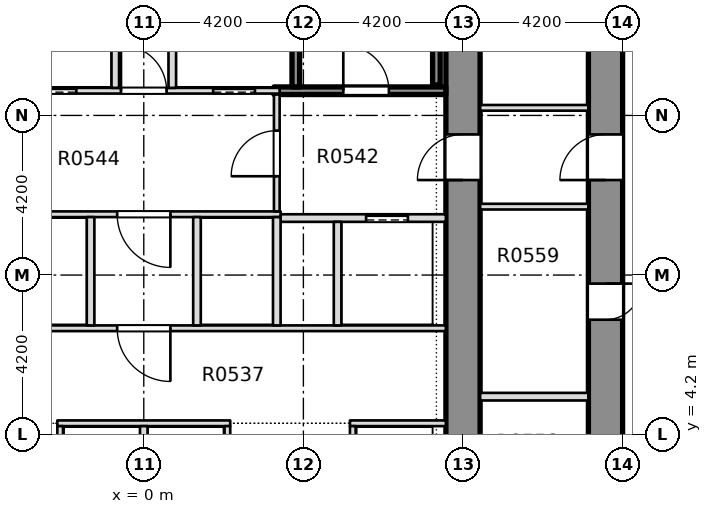
"""IFC4 building model, lengths in metres.
Left out: names, types, materials, properties, quantities, classifications, styles, units other than length and angle.
Written with IfcOpenShell. Run it as: python <this file> out.ifc"""

import sys

from ifc_helpers import new_model, si_unit, direction, frame, frame_2d, origin, place, context, subcontext, project, spatial, rectangle, extrude, element, fill, save


model = new_model("IFC4")
c1 = context("Model", 3, precision=1e-05, world=origin(), true_north=direction((0.0, 1.0)))
c2 = subcontext(c1, "Body", "Model", "MODEL_VIEW")
j1 = project(units=[si_unit("LENGTHUNIT", "METRE"), si_unit("PLANEANGLEUNIT", "RADIAN")], contexts=[c1])
p1 = place(None, origin())
s1 = spatial("IfcSite", under=j1, at=p1, CompositionType="ELEMENT")
p2 = place(p1, origin())
s2 = spatial("IfcBuilding", under=s1, at=p2, CompositionType="ELEMENT")
p3 = place(p2, frame((0.0, 0.0, 30.0)))
s3 = spatial("IfcBuildingStorey", under=s2, at=p3, CompositionType="ELEMENT", Elevation=30.0)
p4 = place(p3, frame((12.15, -8.4, -0.4), z_axis=(0.0, 0.0, 1.0), x_axis=(0.0, 1.0, 0.0)))
e1 = element("IfcWall", 1, at=p4, inside=s3, PredefinedType="SHEAR", context=c2, shape_type="SweptSolid", body=[
    extrude(rectangle(XDim=30.15, YDim=0.9, at=frame_2d((15.075, 0.0))), origin(), (0.0, 0.0, 1.0), 4.58),
])
p5 = place(p4, frame((2.925, 0.0, 0.4)))
e2 = element("IfcOpeningElement", 2, at=p5, cuts=e1, PredefinedType="OPENING", context=c2, shape_type="SweptSolid", body=[
    extrude(rectangle(XDim=0.95, YDim=2.1, at=frame_2d((0.475, 1.05))), frame((0.0, 0.46, 0.0), z_axis=(0.0, -1.0, 0.0), x_axis=(1.0, 0.0, 0.0)), (0.0, 0.0, 1.0), 0.92),
])
p6 = place(p4, frame((7.025, 0.0, 0.4)))
e3 = element("IfcOpeningElement", 3, at=p6, cuts=e1, PredefinedType="OPENING", context=c2, shape_type="SweptSolid", body=[
    extrude(rectangle(XDim=0.95, YDim=2.1, at=frame_2d((0.475, 1.05))), frame((0.0, 0.46, 0.0), z_axis=(0.0, -1.0, 0.0), x_axis=(1.0, 0.0, 0.0)), (0.0, 0.0, 1.0), 0.92),
])
p7 = place(p4, frame((10.875, 0.0, 0.4)))
e4 = element("IfcOpeningElement", 4, at=p7, cuts=e1, PredefinedType="OPENING", context=c2, shape_type="SweptSolid", body=[
    extrude(rectangle(XDim=0.95, YDim=2.1, at=frame_2d((0.475, 1.05))), frame((0.0, 0.46, 0.0), z_axis=(0.0, -1.0, 0.0), x_axis=(1.0, 0.0, 0.0)), (0.0, 0.0, 1.0), 0.92),
])
p8 = place(p4, frame((15.625, 0.0, 0.4)))
e5 = element("IfcOpeningElement", 5, at=p8, cuts=e1, PredefinedType="OPENING", context=c2, shape_type="SweptSolid", body=[
    extrude(rectangle(XDim=0.95, YDim=2.1, at=frame_2d((0.475, 1.05))), frame((0.0, 0.46, 0.0), z_axis=(0.0, -1.0, 0.0), x_axis=(1.0, 0.0, 0.0)), (0.0, 0.0, 1.0), 0.92),
])
p9 = place(p4, frame((24.75, 0.0, 0.4)))
e6 = element("IfcOpeningElement", 6, at=p9, cuts=e1, PredefinedType="OPENING", context=c2, shape_type="SweptSolid", body=[
    extrude(rectangle(XDim=0.95, YDim=2.1, at=frame_2d((0.475, 1.05))), frame((0.0, 0.46, 0.0), z_axis=(0.0, -1.0, 0.0), x_axis=(1.0, 0.0, 0.0)), (0.0, 0.0, 1.0), 0.92),
])
p10 = place(p4, frame((19.3, 0.0, 0.4)))
e7 = element("IfcOpeningElement", 7, at=p10, cuts=e1, PredefinedType="OPENING", context=c2, shape_type="SweptSolid", body=[
    extrude(rectangle(XDim=1.2, YDim=2.1, at=frame_2d((0.6, 1.05))), frame((0.0, 0.46, 0.0), z_axis=(0.0, -1.0, 0.0), x_axis=(1.0, 0.0, 0.0)), (0.0, 0.0, 1.0), 0.92),
])
p11 = place(p3, frame((8.4, -7.5, -0.4), z_axis=(0.0, 0.0, 1.0), x_axis=(0.0, 1.0, 0.0)))
e8 = element("IfcWall", 8, at=p11, inside=s3, PredefinedType="SHEAR", context=c2, shape_type="SweptSolid", body=[
    extrude(rectangle(XDim=28.35, YDim=0.9, at=frame_2d((14.175, 0.0))), origin(), (0.0, 0.0, 1.0), 4.58),
])
p12 = place(p11, frame((18.4, 0.0, 0.4)))
e9 = element("IfcOpeningElement", 9, at=p12, cuts=e8, PredefinedType="OPENING", context=c2, shape_type="SweptSolid", body=[
    extrude(rectangle(XDim=1.2, YDim=2.1, at=frame_2d((0.6, 1.05))), frame((0.0, 0.46, 0.0), z_axis=(0.0, -1.0, 0.0), x_axis=(1.0, 0.0, 0.0)), (0.0, 0.0, 1.0), 0.92),
])
p13 = place(p3, frame((-2.275, 4.5, 0.0), z_axis=(0.0, 0.0, 1.0), x_axis=(1.0, 0.0, 0.0)))
e10 = element("IfcWall", 10, at=p13, inside=s3, PredefinedType="PARTITIONING", context=c2, shape_type="SweptSolid", body=[
    extrude(rectangle(XDim=4.55, YDim=0.15, at=frame_2d((2.275, 0.0))), origin(), (0.0, 0.0, 1.0), 4.18),
])
p14 = place(p3, frame((5.425, 4.5, 0.0), z_axis=(0.0, 0.0, 1.0), x_axis=(1.0, 0.0, 0.0)))
e11 = element("IfcWall", 11, at=p14, inside=s3, PredefinedType="PARTITIONING", context=c2, shape_type="SweptSolid", body=[
    extrude(rectangle(XDim=2.524, YDim=0.15, at=frame_2d((1.262, 0.0))), origin(), (0.0, 0.0, 1.0), 4.18),
])
p15 = place(p3, frame((-7.949, 7.0, 0.0), z_axis=(0.0, 0.0, 1.0), x_axis=(1.0, 0.0, 0.0)))
e12 = element("IfcWall", 12, at=p15, inside=s3, PredefinedType="PARTITIONING", context=c2, shape_type="SweptSolid", body=[
    extrude(rectangle(XDim=15.898, YDim=0.15, at=frame_2d((7.949, 0.0))), origin(), (0.0, 0.0, 1.0), 4.18),
])
p16 = place(p15, frame((7.249, 0.0, 0.0)))
e13 = element("IfcOpeningElement", 13, at=p16, cuts=e12, PredefinedType="OPENING", context=c2, shape_type="SweptSolid", body=[
    extrude(rectangle(XDim=1.4, YDim=2.1, at=frame_2d((0.7, 1.05))), frame((0.0, 0.085, 0.0), z_axis=(0.0, -1.0, 0.0), x_axis=(1.0, 0.0, 0.0)), (0.0, 0.0, 1.0), 0.17),
])
p17 = place(p3, frame((3.6, 9.9, 0.0), z_axis=(0.0, 0.0, 1.0), x_axis=(1.0, 0.0, 0.0)))
e14 = element("IfcWall", 14, at=p17, inside=s3, PredefinedType="PARTITIONING", context=c2, shape_type="SweptSolid", body=[
    extrude(rectangle(XDim=4.349, YDim=0.2, at=frame_2d((2.174, 0.0))), origin(), (0.0, 0.0, 1.0), 4.18),
])
p18 = place(p17, frame((2.25, 0.0, 0.0)))
e15 = element("IfcOpeningElement", 15, at=p18, cuts=e14, PredefinedType="OPENING", context=c2, shape_type="SweptSolid", body=[
    extrude(rectangle(XDim=1.1, YDim=2.1, at=frame_2d((0.55, 1.05))), frame((0.0, 0.11, 0.0), z_axis=(0.0, -1.0, 0.0), x_axis=(1.0, 0.0, 0.0)), (0.0, 0.0, 1.0), 0.22),
])
p19 = place(p3, frame((-3.6, 10.0, 0.0), z_axis=(0.0, 0.0, 1.0), x_axis=(1.0, 0.0, 0.0)))
e16 = element("IfcWall", 16, at=p19, inside=s3, PredefinedType="PARTITIONING", context=c2, shape_type="SweptSolid", body=[
    extrude(rectangle(XDim=7.2, YDim=0.15, at=frame_2d((3.6, 0.0))), origin(), (0.0, 0.0, 1.0), 4.18),
])
p20 = place(p19, frame((2.9, 0.0, 0.0)))
e17 = element("IfcOpeningElement", 17, at=p20, cuts=e16, PredefinedType="OPENING", context=c2, shape_type="SweptSolid", body=[
    extrude(rectangle(XDim=1.4, YDim=2.1, at=frame_2d((0.7, 1.05))), frame((0.0, 0.085, 0.0), z_axis=(0.0, -1.0, 0.0), x_axis=(1.0, 0.0, 0.0)), (0.0, 0.0, 1.0), 0.17),
])
p21 = place(p3, frame((-3.575, 13.25, 0.0), z_axis=(0.0, 0.0, 1.0), x_axis=(1.0, 0.0, 0.0)))
e18 = element("IfcWall", 18, at=p21, inside=s3, PredefinedType="PARTITIONING", context=c2, shape_type="SweptSolid", body=[
    extrude(rectangle(XDim=7.15, YDim=0.15, at=frame_2d((3.575, 0.0))), origin(), (0.0, 0.0, 1.0), 4.18),
])
p22 = place(p21, frame((0.6, 0.0, 0.0)))
e19 = element("IfcOpeningElement", 19, at=p22, cuts=e18, PredefinedType="OPENING", context=c2, shape_type="SweptSolid", body=[
    extrude(rectangle(XDim=1.2, YDim=2.1, at=frame_2d((0.6, 1.05))), frame((0.0, 0.085, 0.0), z_axis=(0.0, -1.0, 0.0), x_axis=(1.0, 0.0, 0.0)), (0.0, 0.0, 1.0), 0.17),
])
p23 = place(p21, frame((5.4, 0.0, 0.0)))
e20 = element("IfcOpeningElement", 20, at=p23, cuts=e18, PredefinedType="OPENING", context=c2, shape_type="SweptSolid", body=[
    extrude(rectangle(XDim=1.1, YDim=2.1, at=frame_2d((0.55, 1.05))), frame((0.0, 0.085, 0.0), z_axis=(0.0, -1.0, 0.0), x_axis=(1.0, 0.0, 0.0)), (0.0, 0.0, 1.0), 0.17),
])
p24 = place(p21, frame((2.975, 0.0, 0.0)))
e21 = element("IfcOpeningElement", 21, at=p24, cuts=e18, PredefinedType="OPENING", context=c2, shape_type="SweptSolid", body=[
    extrude(rectangle(XDim=1.2, YDim=2.1, at=frame_2d((0.6, 1.05))), frame((0.0, 0.085, 0.0), z_axis=(0.0, -1.0, 0.0), x_axis=(1.0, 0.0, 0.0)), (0.0, 0.0, 1.0), 0.17),
])
p25 = place(p3, frame((3.425, 13.25, 0.0), z_axis=(0.0, 0.0, 1.0), x_axis=(1.0, 0.0, 0.0)))
e22 = element("IfcWall", 22, at=p25, inside=s3, PredefinedType="SOLIDWALL", context=c2, shape_type="SweptSolid", body=[
    extrude(rectangle(XDim=4.524, YDim=0.2, at=frame_2d((2.262, 0.0))), origin(), (0.0, 0.0, 1.0), 4.18),
])
p26 = place(p25, frame((1.825, 0.0, 0.0)))
e23 = element("IfcOpeningElement", 23, at=p26, cuts=e22, PredefinedType="OPENING", context=c2, shape_type="SweptSolid", body=[
    extrude(rectangle(XDim=1.2, YDim=2.1, at=frame_2d((0.6, 1.05))), frame((0.0, 0.11, 0.0), z_axis=(0.0, -1.0, 0.0), x_axis=(1.0, 0.0, 0.0)), (0.0, 0.0, 1.0), 0.22),
])
p27 = place(p3, frame((-2.2, -7.499, 0.0), z_axis=(0.0, 0.0, 1.0), x_axis=(0.0, 1.0, 0.0)))
e24 = element("IfcWall", 24, at=p27, inside=s3, PredefinedType="PARTITIONING", context=c2, shape_type="SweptSolid", body=[
    extrude(rectangle(XDim=11.924, YDim=0.15, at=frame_2d((5.962, 0.0))), origin(), (0.0, 0.0, 1.0), 4.18),
])
p28 = place(p27, frame((0.949, 0.0, 0.0)))
e25 = element("IfcOpeningElement", 25, at=p28, cuts=e24, PredefinedType="OPENING", context=c2, shape_type="SweptSolid", body=[
    extrude(rectangle(XDim=1.1, YDim=2.1, at=frame_2d((0.55, 1.05))), frame((0.0, 0.085, 0.0), z_axis=(0.0, -1.0, 0.0), x_axis=(1.0, 0.0, 0.0)), (0.0, 0.0, 1.0), 0.17),
])
p29 = place(p27, frame((3.949, 0.0, 0.0)))
e26 = element("IfcOpeningElement", 26, at=p29, cuts=e24, PredefinedType="OPENING", context=c2, shape_type="SweptSolid", body=[
    extrude(rectangle(XDim=1.1, YDim=2.1, at=frame_2d((0.55, 1.05))), frame((0.0, 0.085, 0.0), z_axis=(0.0, -1.0, 0.0), x_axis=(1.0, 0.0, 0.0)), (0.0, 0.0, 1.0), 0.17),
])
p30 = place(p27, frame((6.949, 0.0, 0.0)))
e27 = element("IfcOpeningElement", 27, at=p30, cuts=e24, PredefinedType="OPENING", context=c2, shape_type="SweptSolid", body=[
    extrude(rectangle(XDim=1.1, YDim=2.1, at=frame_2d((0.55, 1.05))), frame((0.0, 0.085, 0.0), z_axis=(0.0, -1.0, 0.0), x_axis=(1.0, 0.0, 0.0)), (0.0, 0.0, 1.0), 0.17),
])
p31 = place(p27, frame((9.949, 0.0, 0.0)))
e28 = element("IfcOpeningElement", 28, at=p31, cuts=e24, PredefinedType="OPENING", context=c2, shape_type="SweptSolid", body=[
    extrude(rectangle(XDim=1.1, YDim=2.1, at=frame_2d((0.55, 1.05))), frame((0.0, 0.085, 0.0), z_axis=(0.0, -1.0, 0.0), x_axis=(1.0, 0.0, 0.0)), (0.0, 0.0, 1.0), 0.17),
])
p32 = place(p3, frame((-1.4, 7.075, 0.0), z_axis=(0.0, 0.0, 1.0), x_axis=(0.0, 1.0, 0.0)))
e29 = element("IfcWall", 29, at=p32, inside=s3, PredefinedType="PARTITIONING", context=c2, shape_type="SweptSolid", body=[
    extrude(rectangle(XDim=2.85, YDim=0.2, at=frame_2d((1.425, 0.0))), origin(), (0.0, 0.0, 1.0), 4.18),
])
p33 = place(p3, frame((-0.75, 13.325, 0.0), z_axis=(0.0, 0.0, 1.0), x_axis=(0.0, 1.0, 0.0)))
e30 = element("IfcWall", 30, at=p33, inside=s3, PredefinedType="PARTITIONING", context=c2, shape_type="SweptSolid", body=[
    extrude(rectangle(XDim=7.524, YDim=0.2, at=frame_2d((3.762, 0.0))), origin(), (0.0, 0.0, 1.0), 4.18),
])
p34 = place(p33, frame((4.8, 0.0, 0.0)))
e31 = element("IfcOpeningElement", 31, at=p34, cuts=e30, PredefinedType="OPENING", context=c2, shape_type="SweptSolid", body=[
    extrude(rectangle(XDim=0.95, YDim=2.1, at=frame_2d((0.475, 1.05))), frame((0.0, 0.11, 0.0), z_axis=(0.0, -1.0, 0.0), x_axis=(1.0, 0.0, 0.0)), (0.0, 0.0, 1.0), 0.22),
])
p35 = place(p3, frame((0.0, -7.499, 0.0), z_axis=(0.0, 0.0, 1.0), x_axis=(0.0, 1.0, 0.0)))
e32 = element("IfcWall", 32, at=p35, inside=s3, PredefinedType="PARTITIONING", context=c2, shape_type="SweptSolid", body=[
    extrude(rectangle(XDim=11.924, YDim=0.2, at=frame_2d((5.962, 0.0))), origin(), (0.0, 0.0, 1.0), 4.18),
])
p36 = place(p3, frame((0.75, 13.325, 0.0), z_axis=(0.0, 0.0, 1.0), x_axis=(0.0, 1.0, 0.0)))
e33 = element("IfcWall", 33, at=p36, inside=s3, PredefinedType="PARTITIONING", context=c2, shape_type="SweptSolid", body=[
    extrude(rectangle(XDim=2.625, YDim=0.2, at=frame_2d((1.312, 0.0))), origin(), (0.0, 0.0, 1.0), 4.18),
])
p37 = place(p3, frame((1.4, 7.075, 0.0), z_axis=(0.0, 0.0, 1.0), x_axis=(0.0, 1.0, 0.0)))
e34 = element("IfcWall", 34, at=p37, inside=s3, PredefinedType="PARTITIONING", context=c2, shape_type="SweptSolid", body=[
    extrude(rectangle(XDim=2.85, YDim=0.2, at=frame_2d((1.425, 0.0))), origin(), (0.0, 0.0, 1.0), 4.18),
])
p38 = place(p3, frame((2.2, -7.499, 0.0), z_axis=(0.0, 0.0, 1.0), x_axis=(0.0, 1.0, 0.0)))
e35 = element("IfcWall", 35, at=p38, inside=s3, PredefinedType="PARTITIONING", context=c2, shape_type="SweptSolid", body=[
    extrude(rectangle(XDim=11.924, YDim=0.15, at=frame_2d((5.962, 0.0))), origin(), (0.0, 0.0, 1.0), 4.18),
])
p39 = place(p3, frame((3.5, 7.075, 0.0), z_axis=(0.0, 0.0, 1.0), x_axis=(0.0, 1.0, 0.0)))
e36 = element("IfcWall", 36, at=p39, inside=s3, PredefinedType="PARTITIONING", context=c2, shape_type="SweptSolid", body=[
    extrude(rectangle(XDim=2.85, YDim=0.2, at=frame_2d((1.425, 0.0))), origin(), (0.0, 0.0, 1.0), 4.18),
])
p40 = place(p3, frame((3.5, 10.075, 0.0), z_axis=(0.0, 0.0, 1.0), x_axis=(0.0, 1.0, 0.0)))
e37 = element("IfcWall", 37, at=p40, inside=s3, PredefinedType="PARTITIONING", context=c2, shape_type="SweptSolid", body=[
    extrude(rectangle(XDim=3.075, YDim=0.15, at=frame_2d((1.538, 0.0))), origin(), (0.0, 0.0, 1.0), 4.18),
])
p41 = place(p40, frame((0.925, 0.0, 0.0)))
e38 = element("IfcOpeningElement", 38, at=p41, cuts=e37, PredefinedType="OPENING", context=c2, shape_type="SweptSolid", body=[
    extrude(rectangle(XDim=1.2, YDim=2.1, at=frame_2d((0.6, 1.05))), frame((0.0, 0.085, 0.0), z_axis=(0.0, -1.0, 0.0), x_axis=(1.0, 0.0, 0.0)), (0.0, 0.0, 1.0), 0.17),
])
p42 = place(p3, frame((4.0, 13.35, 0.0), z_axis=(0.0, 0.0, 1.0), x_axis=(0.0, 1.0, 0.0)))
e39 = element("IfcWall", 39, at=p42, inside=s3, PredefinedType="SOLIDWALL", context=c2, shape_type="SweptSolid", body=[
    extrude(rectangle(XDim=2.6, YDim=0.2, at=frame_2d((1.3, 0.0))), origin(), (0.0, 0.0, 1.0), 4.18),
])
p43 = place(p3, frame((5.1, 7.075, 0.0), z_axis=(0.0, 0.0, 1.0), x_axis=(0.0, 1.0, 0.0)))
e40 = element("IfcWall", 40, at=p43, inside=s3, PredefinedType="PARTITIONING", context=c2, shape_type="SweptSolid", body=[
    extrude(rectangle(XDim=2.725, YDim=0.2, at=frame_2d((1.363, 0.0))), origin(), (0.0, 0.0, 1.0), 4.18),
])
p44 = place(p3, frame((5.5, -7.499, 0.0), z_axis=(0.0, 0.0, 1.0), x_axis=(0.0, 1.0, 0.0)))
e41 = element("IfcWall", 41, at=p44, inside=s3, PredefinedType="PARTITIONING", context=c2, shape_type="SweptSolid", body=[
    extrude(rectangle(XDim=11.924, YDim=0.15, at=frame_2d((5.962, 0.0))), origin(), (0.0, 0.0, 1.0), 4.18),
])
p45 = place(p44, frame((6.949, 0.0, 0.0)))
e42 = element("IfcOpeningElement", 42, at=p45, cuts=e41, PredefinedType="OPENING", context=c2, shape_type="SweptSolid", body=[
    extrude(rectangle(XDim=1.1, YDim=2.1, at=frame_2d((0.55, 1.05))), frame((0.0, 0.085, 0.0), z_axis=(0.0, -1.0, 0.0), x_axis=(1.0, 0.0, 0.0)), (0.0, 0.0, 1.0), 0.17),
])
p46 = place(p44, frame((9.949, 0.0, 0.0)))
e43 = element("IfcOpeningElement", 43, at=p46, cuts=e41, PredefinedType="OPENING", context=c2, shape_type="SweptSolid", body=[
    extrude(rectangle(XDim=1.1, YDim=2.1, at=frame_2d((0.55, 1.05))), frame((0.0, 0.085, 0.0), z_axis=(0.0, -1.0, 0.0), x_axis=(1.0, 0.0, 0.0)), (0.0, 0.0, 1.0), 0.17),
])
p47 = place(p3, frame((8.851, 5.2, 0.0), z_axis=(0.0, 0.0, 1.0), x_axis=(1.0, 0.0, 0.0)))
e44 = element("IfcWall", 44, at=p47, inside=s3, PredefinedType="PARTITIONING", context=c2, shape_type="SweptSolid", body=[
    extrude(rectangle(XDim=2.848, YDim=0.2, at=frame_2d((1.424, 0.0))), origin(), (0.0, 0.0, 1.0), 4.18),
])
for number, where, z_axis, x_axis in (
    (45, (8.851, 10.2, 0.0), (0.0, 0.0, 1.0), (1.0, 0.0, 0.0)),
    (46, (8.851, 12.8, 0.0), (0.0, 0.0, 1.0), (1.0, 0.0, 0.0)),
):
    element("IfcWall", number, at=place(p3, frame(where, z_axis=z_axis, x_axis=x_axis)), inside=s3, PredefinedType="PARTITIONING", context=c2, shape_type="SweptSolid", body=[
        extrude(rectangle(XDim=2.848, YDim=0.15, at=frame_2d((1.424, 0.0))), origin(), (0.0, 0.0, 1.0), 4.18),
    ])
p48 = place(p3, frame((7.7, 13.4, 0.0), z_axis=(0.0, 0.0, 1.0), x_axis=(0.0, 1.0, 0.0)))
e47 = element("IfcWall", 47, at=p48, inside=s3, PredefinedType="SOLIDWALL", context=c2, shape_type="SweptSolid", body=[
    extrude(rectangle(XDim=7.4, YDim=0.2, at=frame_2d((3.7, 0.0))), origin(), (0.0, 0.0, 1.0), 4.18),
])
p49 = place(p26, origin())
e48 = element("IfcDoor", 48, at=p49, inside=s3, OperationType="SINGLE_SWING_RIGHT", PredefinedType="DOOR", context=c2, shape_type="SweptSolid", body=[
    extrude(rectangle(XDim=1.2, YDim=2.1, at=frame_2d((0.6, 1.05))), frame((0.0, 0.025, 0.0), z_axis=(0.0, -1.0, 0.0), x_axis=(1.0, 0.0, 0.0)), (0.0, 0.0, 1.0), 0.05),
])
fill(e23, e48)
p50 = place(p18, origin())
e49 = element("IfcDoor", 49, at=p50, inside=s3, OperationType="SLIDING_TO_LEFT", PredefinedType="DOOR", context=c2, shape_type="SweptSolid", body=[
    extrude(rectangle(XDim=1.1, YDim=2.1, at=frame_2d((0.55, 1.05))), frame((0.0, 0.025, 0.0), z_axis=(0.0, -1.0, 0.0), x_axis=(1.0, 0.0, 0.0)), (0.0, 0.0, 1.0), 0.05),
])
fill(e15, e49)
p51 = place(p16, origin())
e50 = element("IfcDoor", 50, at=p51, inside=s3, OperationType="SINGLE_SWING_RIGHT", PredefinedType="DOOR", context=c2, shape_type="SweptSolid", body=[
    extrude(rectangle(XDim=1.4, YDim=2.1, at=frame_2d((0.7, 1.05))), frame((0.0, 0.025, 0.0), z_axis=(0.0, -1.0, 0.0), x_axis=(1.0, 0.0, 0.0)), (0.0, 0.0, 1.0), 0.05),
])
fill(e13, e50)
p52 = place(p20, origin())
e51 = element("IfcDoor", 51, at=p52, inside=s3, OperationType="SINGLE_SWING_RIGHT", PredefinedType="DOOR", context=c2, shape_type="SweptSolid", body=[
    extrude(rectangle(XDim=1.4, YDim=2.1, at=frame_2d((0.7, 1.05))), frame((0.0, 0.025, 0.0), z_axis=(0.0, -1.0, 0.0), x_axis=(1.0, 0.0, 0.0)), (0.0, 0.0, 1.0), 0.05),
])
fill(e17, e51)
p53 = place(p22, origin())
e52 = element("IfcDoor", 52, at=p53, inside=s3, OperationType="SLIDING_TO_RIGHT", PredefinedType="DOOR", context=c2, shape_type="SweptSolid", body=[
    extrude(rectangle(XDim=1.2, YDim=2.1, at=frame_2d((0.6, 1.05))), frame((0.0, 0.025, 0.0), z_axis=(0.0, -1.0, 0.0), x_axis=(1.0, 0.0, 0.0)), (0.0, 0.0, 1.0), 0.05),
])
fill(e19, e52)
p54 = place(p23, origin())
e53 = element("IfcDoor", 53, at=p54, inside=s3, OperationType="SLIDING_TO_LEFT", PredefinedType="DOOR", context=c2, shape_type="SweptSolid", body=[
    extrude(rectangle(XDim=1.1, YDim=2.1, at=frame_2d((0.55, 1.05))), frame((0.0, 0.025, 0.0), z_axis=(0.0, -1.0, 0.0), x_axis=(1.0, 0.0, 0.0)), (0.0, 0.0, 1.0), 0.05),
])
fill(e20, e53)
p55 = place(p24, origin())
e54 = element("IfcDoor", 54, at=p55, inside=s3, OperationType="SINGLE_SWING_RIGHT", PredefinedType="DOOR", context=c2, shape_type="SweptSolid", body=[
    extrude(rectangle(XDim=1.2, YDim=2.1, at=frame_2d((0.6, 1.05))), frame((0.0, 0.025, 0.0), z_axis=(0.0, -1.0, 0.0), x_axis=(1.0, 0.0, 0.0)), (0.0, 0.0, 1.0), 0.05),
])
fill(e21, e54)
p56 = place(p41, origin())
e55 = element("IfcDoor", 55, at=p56, inside=s3, OperationType="SINGLE_SWING_LEFT", PredefinedType="DOOR", context=c2, shape_type="SweptSolid", body=[
    extrude(rectangle(XDim=1.2, YDim=2.1, at=frame_2d((0.6, 1.05))), frame((0.0, 0.025, 0.0), z_axis=(0.0, -1.0, 0.0), x_axis=(1.0, 0.0, 0.0)), (0.0, 0.0, 1.0), 0.05),
])
fill(e38, e55)
p57 = place(p8, origin())
e56 = element("IfcDoor", 56, at=p57, inside=s3, OperationType="SINGLE_SWING_LEFT", PredefinedType="DOOR", context=c2, shape_type="SweptSolid", body=[
    extrude(rectangle(XDim=0.95, YDim=2.1, at=frame_2d((0.475, 1.05))), frame((0.0, 0.025, 0.0), z_axis=(0.0, -1.0, 0.0), x_axis=(1.0, 0.0, 0.0)), (0.0, 0.0, 1.0), 0.05),
])
fill(e5, e56)
p58 = place(p10, origin())
e57 = element("IfcDoor", 57, at=p58, inside=s3, OperationType="SINGLE_SWING_LEFT", PredefinedType="DOOR", context=c2, shape_type="SweptSolid", body=[
    extrude(rectangle(XDim=1.2, YDim=2.1, at=frame_2d((0.6, 1.05))), frame((0.0, 0.025, 0.0), z_axis=(0.0, -1.0, 0.0), x_axis=(1.0, 0.0, 0.0)), (0.0, 0.0, 1.0), 0.05),
])
fill(e7, e57)
p59 = place(p12, origin())
e58 = element("IfcDoor", 58, at=p59, inside=s3, OperationType="SINGLE_SWING_LEFT", PredefinedType="DOOR", context=c2, shape_type="SweptSolid", body=[
    extrude(rectangle(XDim=1.2, YDim=2.1, at=frame_2d((0.6, 1.05))), frame((0.0, 0.025, 0.0), z_axis=(0.0, -1.0, 0.0), x_axis=(1.0, 0.0, 0.0)), (0.0, 0.0, 1.0), 0.05),
])
fill(e9, e58)
save(model, sys.argv[1])
